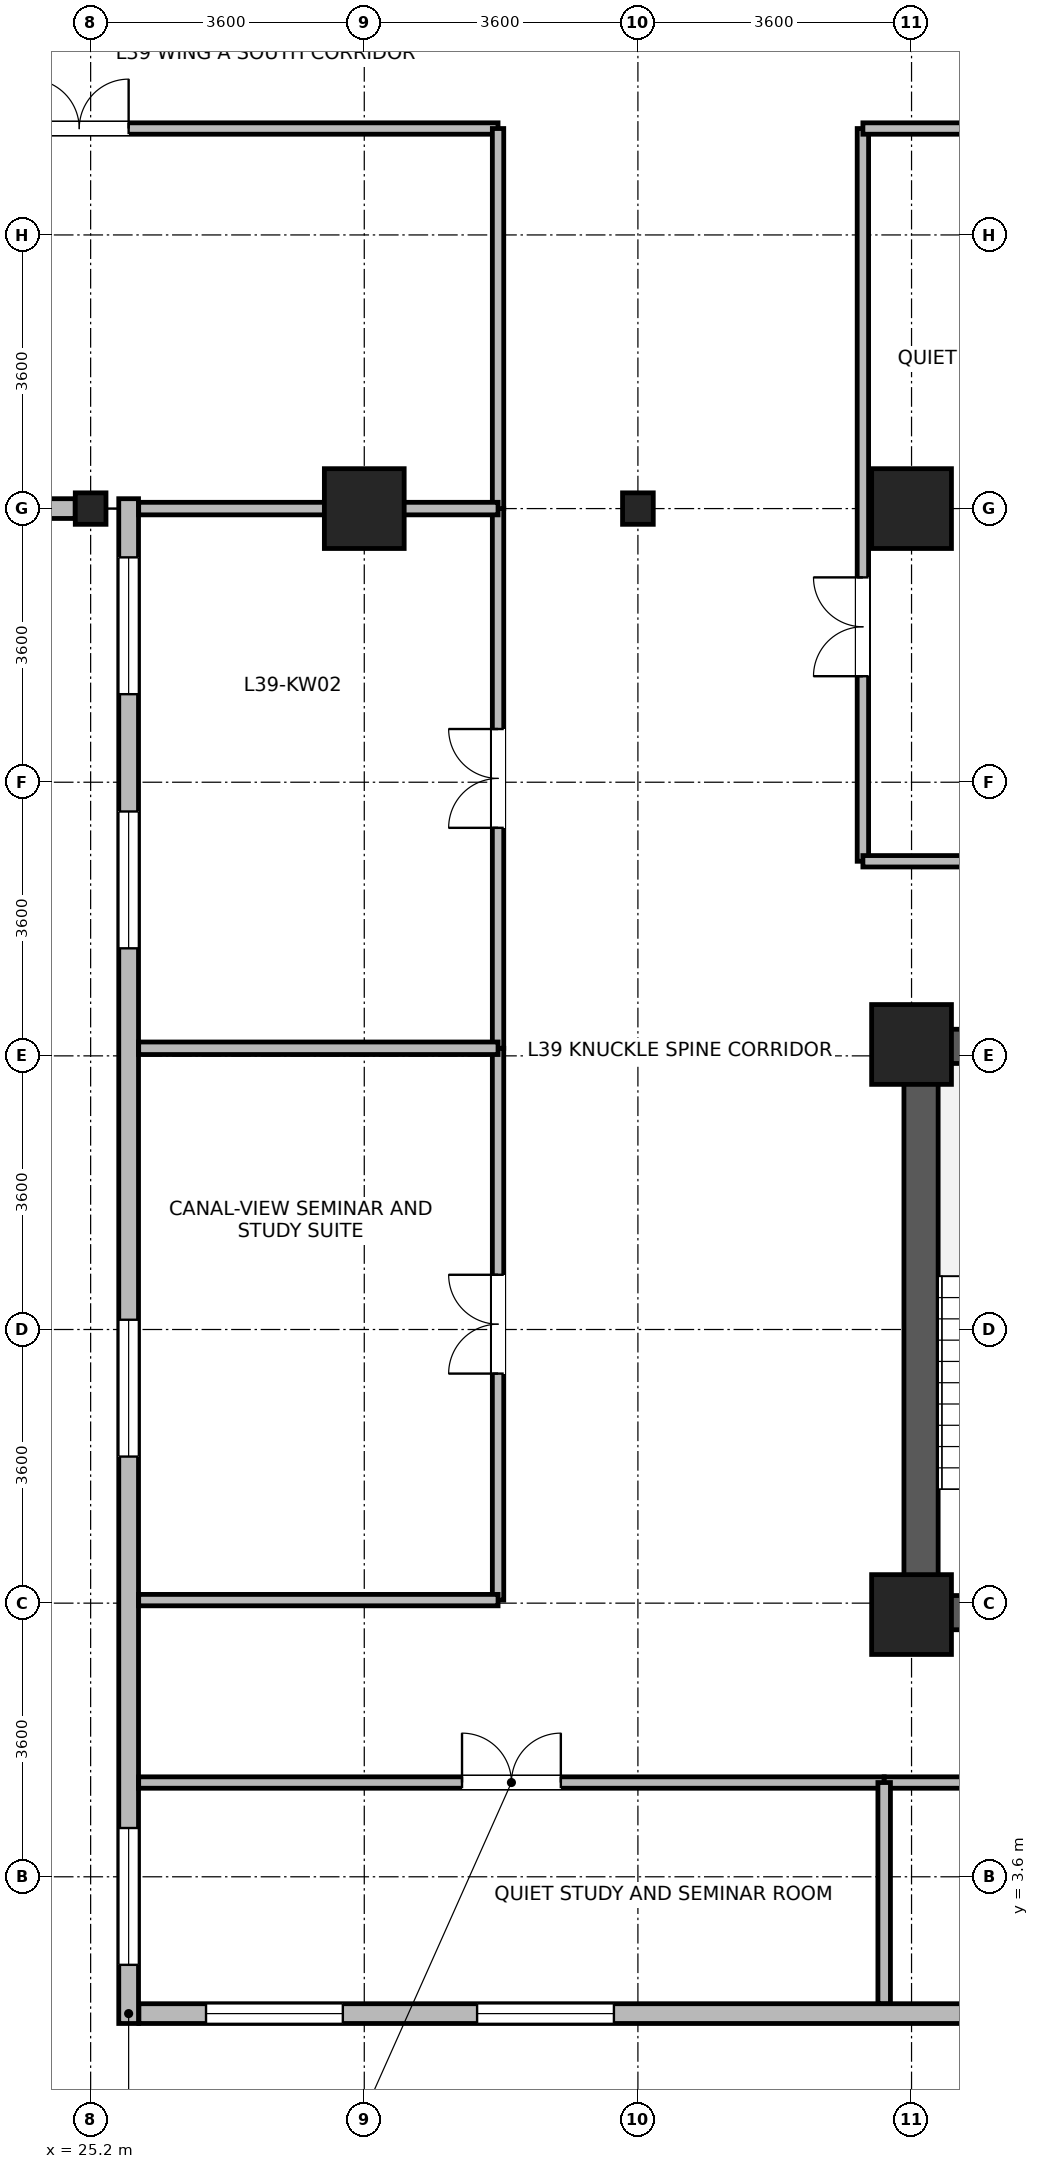
"""IFC4 building model, lengths in metres.
Left out: names, types, materials, properties, quantities, classifications, styles, units other than length and angle.
Written with IfcOpenShell. Run it as: python <this file> out.ifc"""

import sys

from ifc_helpers import new_model, si_unit, direction, frame, frame_2d, origin, origin_2d, place, context, subcontext, project, spatial, rectangle, i_section, extrude, source, transform, mapped, element, fill, save


model = new_model("IFC4")
c1 = context("Model", 3, precision=1e-05, world=origin(), true_north=direction((0.0, 1.0)))
c2 = subcontext(c1, "Body", "Model", "MODEL_VIEW")
j1 = project(units=[si_unit("LENGTHUNIT", "METRE"), si_unit("PLANEANGLEUNIT", "RADIAN")], contexts=[c1])
p1 = place(None, origin())
s1 = spatial("IfcSite", under=j1, at=p1, CompositionType="ELEMENT")
p2 = place(p1, origin())
s2 = spatial("IfcBuilding", under=s1, at=p2, CompositionType="ELEMENT")
p3 = place(p2, frame((0.0, 0.0, 155.0)))
s3 = spatial("IfcBuildingStorey", under=s2, at=p3, CompositionType="ELEMENT", Elevation=155.0)
p4 = place(p3, frame((36.125, 6.85, 0.0), z_axis=(0.0, 0.0, 1.0), x_axis=(0.0, 1.0, 0.0)))
e1 = element("IfcWall", 1, at=p4, inside=s3, PredefinedType="SHEAR", context=c2, shape_type="SweptSolid", body=[
    extrude(rectangle(XDim=7.9, YDim=0.45, at=frame_2d((3.95, 0.0))), origin(), (0.0, 0.0, 1.0), 3.46),
])
for number, where, z_axis, x_axis in (
    (2, (36.35, 7.075, 0.0), (0.0, 0.0, 1.0), (1.0, 0.0, 0.0)),
    (3, (36.35, 14.525, 0.0), (0.0, 0.0, 1.0), (1.0, 0.0, 0.0)),
):
    element("IfcWall", number, at=place(p3, frame(where, z_axis=z_axis, x_axis=x_axis)), inside=s3, PredefinedType="SHEAR", context=c2, shape_type="SweptSolid", body=[
        extrude(rectangle(XDim=3.2, YDim=0.45, at=frame_2d((1.6, 0.0))), origin(), (0.0, 0.0, 1.0), 3.46),
    ])
m1 = source(origin(), c2, "Body", "SweptSolid", [
    extrude(rectangle(XDim=1.05, YDim=1.05, at=origin_2d()), origin(), (0.0, 0.0, 1.0), 3.7),
])
for number, where, z_axis, x_axis in (
    (4, (28.8, 21.6, 0.0), (0.0, 0.0, 1.0), (1.0, 0.0, 0.0)),
    (5, (36.0, 21.6, 0.0), (0.0, 0.0, 1.0), (1.0, 0.0, 0.0)),
    (6, (36.0, 7.05, 0.0), (0.0, 0.0, 1.0), (1.0, 0.0, 0.0)),
    (7, (36.0, 14.55, 0.0), (0.0, 0.0, 1.0), (1.0, 0.0, 0.0)),
):
    element("IfcColumn", number, at=place(p3, frame(where, z_axis=z_axis, x_axis=x_axis)), inside=s3, PredefinedType="COLUMN", context=c2, shape_type="MappedRepresentation", body=[
        mapped(m1, transform((0.0, 0.0, 0.0), x_axis=(1.0, 0.0, 0.0), y_axis=(0.0, 1.0, 0.0), z_axis=(0.0, 0.0, 1.0), scale=1.0)),
    ])
m2 = source(origin(), c2, "Body", "SweptSolid", [
    extrude(i_section(OverallWidth=0.404, OverallDepth=0.414, WebThickness=0.021, FlangeThickness=0.028, FilletRadius=0.015, at=origin_2d()), origin(), (0.0, 0.0, 1.0), 3.7),
])
for number, where, z_axis, x_axis in (
    (8, (25.2, 21.6, 0.0), (0.0, 0.0, 1.0), (1.0, 0.0, 0.0)),
    (9, (32.4, 21.6, 0.0), (0.0, 0.0, 1.0), (1.0, 0.0, 0.0)),
):
    element("IfcColumn", number, at=place(p3, frame(where, z_axis=z_axis, x_axis=x_axis)), inside=s3, PredefinedType="COLUMN", context=c2, shape_type="MappedRepresentation", body=[
        mapped(m2, transform((0.0, 0.0, 0.0), x_axis=(1.0, 0.0, 0.0), y_axis=(0.0, 1.0, 0.0), z_axis=(0.0, 0.0, 1.0), scale=1.0)),
    ])
p5 = place(p3, frame((54.365, 1.8, 0.0), z_axis=(0.0, 0.0, 1.0), x_axis=(-1.0, 0.0, 0.0)))
e10 = element("IfcWall", 10, at=p5, inside=s3, PredefinedType="STANDARD", context=c2, shape_type="SweptSolid", body=[
    extrude(rectangle(XDim=28.53, YDim=0.26, at=frame_2d((14.265, 0.0))), origin(), (0.0, 0.0, 1.0), 3.44),
])
p6 = place(p5, frame((0.883, 0.0, 0.85)))
e11 = element("IfcOpeningElement", 11, at=p6, cuts=e10, PredefinedType="OPENING", context=c2, shape_type="SweptSolid", body=[
    extrude(rectangle(XDim=1.8, YDim=1.85, at=frame_2d((0.9, 0.925))), frame((0.0, 0.14, 0.0), z_axis=(0.0, -1.0, 0.0), x_axis=(1.0, 0.0, 0.0)), (0.0, 0.0, 1.0), 0.28),
])
p7 = place(p5, frame((4.449, 0.0, 0.85)))
e12 = element("IfcOpeningElement", 12, at=p7, cuts=e10, PredefinedType="OPENING", context=c2, shape_type="SweptSolid", body=[
    extrude(rectangle(XDim=1.8, YDim=1.85, at=frame_2d((0.9, 0.925))), frame((0.0, 0.14, 0.0), z_axis=(0.0, -1.0, 0.0), x_axis=(1.0, 0.0, 0.0)), (0.0, 0.0, 1.0), 0.28),
])
p8 = place(p5, frame((11.582, 0.0, 0.85)))
e13 = element("IfcOpeningElement", 13, at=p8, cuts=e10, PredefinedType="OPENING", context=c2, shape_type="SweptSolid", body=[
    extrude(rectangle(XDim=1.8, YDim=1.85, at=frame_2d((0.9, 0.925))), frame((0.0, 0.14, 0.0), z_axis=(0.0, -1.0, 0.0), x_axis=(1.0, 0.0, 0.0)), (0.0, 0.0, 1.0), 0.28),
])
p9 = place(p5, frame((15.148, 0.0, 0.85)))
e14 = element("IfcOpeningElement", 14, at=p9, cuts=e10, PredefinedType="OPENING", context=c2, shape_type="SweptSolid", body=[
    extrude(rectangle(XDim=1.8, YDim=1.85, at=frame_2d((0.9, 0.925))), frame((0.0, 0.14, 0.0), z_axis=(0.0, -1.0, 0.0), x_axis=(1.0, 0.0, 0.0)), (0.0, 0.0, 1.0), 0.28),
])
p10 = place(p5, frame((22.281, 0.0, 0.85)))
e15 = element("IfcOpeningElement", 15, at=p10, cuts=e10, PredefinedType="OPENING", context=c2, shape_type="SweptSolid", body=[
    extrude(rectangle(XDim=1.8, YDim=1.85, at=frame_2d((0.9, 0.925))), frame((0.0, 0.14, 0.0), z_axis=(0.0, -1.0, 0.0), x_axis=(1.0, 0.0, 0.0)), (0.0, 0.0, 1.0), 0.28),
])
p11 = place(p5, frame((25.847, 0.0, 0.85)))
e16 = element("IfcOpeningElement", 16, at=p11, cuts=e10, PredefinedType="OPENING", context=c2, shape_type="SweptSolid", body=[
    extrude(rectangle(XDim=1.8, YDim=1.85, at=frame_2d((0.9, 0.925))), frame((0.0, 0.14, 0.0), z_axis=(0.0, -1.0, 0.0), x_axis=(1.0, 0.0, 0.0)), (0.0, 0.0, 1.0), 0.28),
])
p12 = place(p3, frame((24.997, 21.6, 0.0), z_axis=(0.0, 0.0, 1.0), x_axis=(-1.0, 0.0, 0.0)))
e17 = element("IfcWall", 17, at=p12, inside=s3, PredefinedType="STANDARD", context=c2, shape_type="SweptSolid", body=[
    extrude(rectangle(XDim=2.871, YDim=0.26, at=frame_2d((1.436, 0.0))), origin(), (0.0, 0.0, 1.0), 2.99),
])
p13 = place(p12, frame((0.96, 0.0, 0.85)))
e18 = element("IfcOpeningElement", 18, at=p13, cuts=e17, PredefinedType="OPENING", context=c2, shape_type="SweptSolid", body=[
    extrude(rectangle(XDim=0.95, YDim=1.75, at=frame_2d((0.475, 0.875))), frame((0.0, 0.14, 0.0), z_axis=(0.0, -1.0, 0.0), x_axis=(1.0, 0.0, 0.0)), (0.0, 0.0, 1.0), 0.28),
])
p14 = place(p3, frame((25.7, 1.67, 0.0), z_axis=(0.0, 0.0, 1.0), x_axis=(0.0, 1.0, 0.0)))
e19 = element("IfcWall", 19, at=p14, inside=s3, PredefinedType="STANDARD", context=c2, shape_type="SweptSolid", body=[
    extrude(rectangle(XDim=20.06, YDim=0.26, at=frame_2d((10.03, 0.0))), origin(), (0.0, 0.0, 1.0), 3.44),
])
p15 = place(p14, frame((0.772, 0.0, 0.85)))
e20 = element("IfcOpeningElement", 20, at=p15, cuts=e19, PredefinedType="OPENING", context=c2, shape_type="SweptSolid", body=[
    extrude(rectangle(XDim=1.8, YDim=1.85, at=frame_2d((0.9, 0.925))), frame((0.0, 0.14, 0.0), z_axis=(0.0, -1.0, 0.0), x_axis=(1.0, 0.0, 0.0)), (0.0, 0.0, 1.0), 0.28),
])
p16 = place(p14, frame((7.458, 0.0, 0.85)))
e21 = element("IfcOpeningElement", 21, at=p16, cuts=e19, PredefinedType="OPENING", context=c2, shape_type="SweptSolid", body=[
    extrude(rectangle(XDim=1.8, YDim=1.85, at=frame_2d((0.9, 0.925))), frame((0.0, 0.14, 0.0), z_axis=(0.0, -1.0, 0.0), x_axis=(1.0, 0.0, 0.0)), (0.0, 0.0, 1.0), 0.28),
])
p17 = place(p14, frame((14.145, 0.0, 0.85)))
e22 = element("IfcOpeningElement", 22, at=p17, cuts=e19, PredefinedType="OPENING", context=c2, shape_type="SweptSolid", body=[
    extrude(rectangle(XDim=1.8, YDim=1.85, at=frame_2d((0.9, 0.925))), frame((0.0, 0.14, 0.0), z_axis=(0.0, -1.0, 0.0), x_axis=(1.0, 0.0, 0.0)), (0.0, 0.0, 1.0), 0.28),
])
p18 = place(p14, frame((17.488, 0.0, 0.85)))
e23 = element("IfcOpeningElement", 23, at=p18, cuts=e19, PredefinedType="OPENING", context=c2, shape_type="SweptSolid", body=[
    extrude(rectangle(XDim=1.8, YDim=1.85, at=frame_2d((0.9, 0.925))), frame((0.0, 0.14, 0.0), z_axis=(0.0, -1.0, 0.0), x_axis=(1.0, 0.0, 0.0)), (0.0, 0.0, 1.0), 0.28),
])
p19 = place(p3, frame((19.54, 26.6, 0.0), z_axis=(0.0, 0.0, 1.0), x_axis=(1.0, 0.0, 0.0)))
e24 = element("IfcWall", 24, at=p19, inside=s3, PredefinedType="PARTITIONING", context=c2, shape_type="SweptSolid", body=[
    extrude(rectangle(XDim=11.02, YDim=0.15, at=frame_2d((5.51, 0.0))), origin(), (0.0, 0.0, 1.0), 3.44),
])
p20 = place(p19, frame((4.86, 0.0, 0.0)))
e25 = element("IfcOpeningElement", 25, at=p20, cuts=e24, PredefinedType="OPENING", context=c2, shape_type="SweptSolid", body=[
    extrude(rectangle(XDim=1.3, YDim=2.12, at=frame_2d((0.65, 1.06))), frame((0.0, 0.085, 0.0), z_axis=(0.0, -1.0, 0.0), x_axis=(1.0, 0.0, 0.0)), (0.0, 0.0, 1.0), 0.17),
])
p21 = place(p3, frame((25.832, 4.84, 0.0), z_axis=(0.0, 0.0, 1.0), x_axis=(1.0, 0.0, 0.0)))
e26 = element("IfcWall", 26, at=p21, inside=s3, PredefinedType="PARTITIONING", context=c2, shape_type="SweptSolid", body=[
    extrude(rectangle(XDim=9.808, YDim=0.15, at=frame_2d((4.904, 0.0))), origin(), (0.0, 0.0, 1.0), 3.44),
])
p22 = place(p21, frame((4.254, 0.0, 0.0)))
e27 = element("IfcOpeningElement", 27, at=p22, cuts=e26, PredefinedType="OPENING", context=c2, shape_type="SweptSolid", body=[
    extrude(rectangle(XDim=1.3, YDim=2.12, at=frame_2d((0.65, 1.06))), frame((0.0, 0.085, 0.0), z_axis=(0.0, -1.0, 0.0), x_axis=(1.0, 0.0, 0.0)), (0.0, 0.0, 1.0), 0.17),
])
p23 = place(p3, frame((35.36, 16.96, 0.0), z_axis=(0.0, 0.0, 1.0), x_axis=(0.0, 1.0, 0.0)))
e28 = element("IfcWall", 28, at=p23, inside=s3, PredefinedType="PARTITIONING", context=c2, shape_type="SweptSolid", body=[
    extrude(rectangle(XDim=9.64, YDim=0.15, at=frame_2d((4.82, 0.0))), origin(), (0.0, 0.0, 1.0), 3.44),
])
p24 = place(p23, frame((2.435, 0.0, 0.0)))
e29 = element("IfcOpeningElement", 29, at=p24, cuts=e28, PredefinedType="OPENING", context=c2, shape_type="SweptSolid", body=[
    extrude(rectangle(XDim=1.3, YDim=2.12, at=frame_2d((0.65, 1.06))), frame((0.0, 0.085, 0.0), z_axis=(0.0, -1.0, 0.0), x_axis=(1.0, 0.0, 0.0)), (0.0, 0.0, 1.0), 0.17),
])
p25 = place(p3, frame((35.64, 4.84, 0.0), z_axis=(0.0, 0.0, 1.0), x_axis=(1.0, 0.0, 0.0)))
e30 = element("IfcWall", 30, at=p25, inside=s3, PredefinedType="PARTITIONING", context=c2, shape_type="SweptSolid", body=[
    extrude(rectangle(XDim=9.18, YDim=0.15, at=frame_2d((4.59, 0.0))), origin(), (0.0, 0.0, 1.0), 3.44),
])
p26 = place(p25, frame((4.115, 0.0, 0.0)))
e31 = element("IfcOpeningElement", 31, at=p26, cuts=e30, PredefinedType="OPENING", context=c2, shape_type="SweptSolid", body=[
    extrude(rectangle(XDim=0.95, YDim=2.1, at=frame_2d((0.475, 1.05))), frame((0.0, 0.085, 0.0), z_axis=(0.0, -1.0, 0.0), x_axis=(1.0, 0.0, 0.0)), (0.0, 0.0, 1.0), 0.17),
])
p27 = place(p3, frame((30.56, 7.24, 0.0), z_axis=(0.0, 0.0, 1.0), x_axis=(0.0, 1.0, 0.0)))
e32 = element("IfcWall", 32, at=p27, inside=s3, PredefinedType="PARTITIONING", context=c2, shape_type="SweptSolid", body=[
    extrude(rectangle(XDim=7.26, YDim=0.15, at=frame_2d((3.63, 0.0))), origin(), (0.0, 0.0, 1.0), 3.44),
])
p28 = place(p27, frame((2.98, 0.0, 0.0)))
e33 = element("IfcOpeningElement", 33, at=p28, cuts=e32, PredefinedType="OPENING", context=c2, shape_type="SweptSolid", body=[
    extrude(rectangle(XDim=1.3, YDim=2.12, at=frame_2d((0.65, 1.06))), frame((0.0, 0.085, 0.0), z_axis=(0.0, -1.0, 0.0), x_axis=(1.0, 0.0, 0.0)), (0.0, 0.0, 1.0), 0.17),
])
p29 = place(p3, frame((30.56, 14.5, 0.0), z_axis=(0.0, 0.0, 1.0), x_axis=(0.0, 1.0, 0.0)))
e34 = element("IfcWall", 34, at=p29, inside=s3, PredefinedType="PARTITIONING", context=c2, shape_type="SweptSolid", body=[
    extrude(rectangle(XDim=7.1, YDim=0.15, at=frame_2d((3.55, 0.0))), origin(), (0.0, 0.0, 1.0), 3.44),
])
p30 = place(p29, frame((2.9, 0.0, 0.0)))
e35 = element("IfcOpeningElement", 35, at=p30, cuts=e34, PredefinedType="OPENING", context=c2, shape_type="SweptSolid", body=[
    extrude(rectangle(XDim=1.3, YDim=2.12, at=frame_2d((0.65, 1.06))), frame((0.0, 0.085, 0.0), z_axis=(0.0, -1.0, 0.0), x_axis=(1.0, 0.0, 0.0)), (0.0, 0.0, 1.0), 0.17),
])
for number, where, z_axis, x_axis in (
    (36, (35.36, 16.96, 0.0), (0.0, 0.0, 1.0), (1.0, 0.0, 0.0)),
    (37, (35.36, 26.6, 0.0), (0.0, 0.0, 1.0), (1.0, 0.0, 0.0)),
):
    element("IfcWall", number, at=place(p3, frame(where, z_axis=z_axis, x_axis=x_axis)), inside=s3, PredefinedType="PARTITIONING", context=c2, shape_type="SweptSolid", body=[
        extrude(rectangle(XDim=5.38, YDim=0.15, at=frame_2d((2.69, 0.0))), origin(), (0.0, 0.0, 1.0), 3.44),
    ])
p31 = place(p3, frame((30.56, 21.6, 0.0), z_axis=(0.0, 0.0, 1.0), x_axis=(0.0, 1.0, 0.0)))
e38 = element("IfcWall", 38, at=p31, inside=s3, PredefinedType="PARTITIONING", context=c2, shape_type="SweptSolid", body=[
    extrude(rectangle(XDim=5.0, YDim=0.15, at=frame_2d((2.5, 0.0))), origin(), (0.0, 0.0, 1.0), 3.44),
])
p32 = place(p3, frame((25.832, 7.24, 0.0), z_axis=(0.0, 0.0, 1.0), x_axis=(1.0, 0.0, 0.0)))
e39 = element("IfcWall", 39, at=p32, inside=s3, PredefinedType="PARTITIONING", context=c2, shape_type="SweptSolid", body=[
    extrude(rectangle(XDim=4.728, YDim=0.15, at=frame_2d((2.364, 0.0))), origin(), (0.0, 0.0, 1.0), 3.44),
])
p33 = place(p3, frame((25.832, 14.5, 0.0), z_axis=(0.0, 0.0, 1.0), x_axis=(1.0, 0.0, 0.0)))
e40 = element("IfcWall", 40, at=p33, inside=s3, PredefinedType="PARTITIONING", context=c2, shape_type="SweptSolid", body=[
    extrude(rectangle(XDim=4.728, YDim=0.165, at=frame_2d((2.364, 0.0))), origin(), (0.0, 0.0, 1.0), 3.44),
])
p34 = place(p3, frame((25.832, 21.6, 0.0), z_axis=(0.0, 0.0, 1.0), x_axis=(1.0, 0.0, 0.0)))
e41 = element("IfcWall", 41, at=p34, inside=s3, PredefinedType="PARTITIONING", context=c2, shape_type="SweptSolid", body=[
    extrude(rectangle(XDim=4.728, YDim=0.165, at=frame_2d((2.364, 0.0))), origin(), (0.0, 0.0, 1.0), 2.99),
])
p35 = place(p3, frame((35.64, 1.932, 0.0), z_axis=(0.0, 0.0, 1.0), x_axis=(0.0, 1.0, 0.0)))
e42 = element("IfcWall", 42, at=p35, inside=s3, PredefinedType="PARTITIONING", context=c2, shape_type="SweptSolid", body=[
    extrude(rectangle(XDim=2.908, YDim=0.165, at=frame_2d((1.454, 0.0))), origin(), (0.0, 0.0, 1.0), 3.44),
])
p36 = place(p10, origin())
e43 = element("IfcWindow", 43, at=p36, inside=s3, PartitioningType="SINGLE_PANEL", PredefinedType="WINDOW", context=c2, shape_type="SweptSolid", body=[
    extrude(rectangle(XDim=1.8, YDim=1.85, at=frame_2d((0.9, 0.925))), frame((0.0, 0.03, 0.0), z_axis=(0.0, -1.0, 0.0), x_axis=(1.0, 0.0, 0.0)), (0.0, 0.0, 1.0), 0.06),
])
fill(e15, e43)
p37 = place(p11, origin())
e44 = element("IfcWindow", 44, at=p37, inside=s3, PartitioningType="SINGLE_PANEL", PredefinedType="WINDOW", context=c2, shape_type="SweptSolid", body=[
    extrude(rectangle(XDim=1.8, YDim=1.85, at=frame_2d((0.9, 0.925))), frame((0.0, 0.03, 0.0), z_axis=(0.0, -1.0, 0.0), x_axis=(1.0, 0.0, 0.0)), (0.0, 0.0, 1.0), 0.06),
])
fill(e16, e44)
p38 = place(p15, origin())
e45 = element("IfcWindow", 45, at=p38, inside=s3, PartitioningType="SINGLE_PANEL", PredefinedType="WINDOW", context=c2, shape_type="SweptSolid", body=[
    extrude(rectangle(XDim=1.8, YDim=1.85, at=frame_2d((0.9, 0.925))), frame((0.0, 0.03, 0.0), z_axis=(0.0, -1.0, 0.0), x_axis=(1.0, 0.0, 0.0)), (0.0, 0.0, 1.0), 0.06),
])
fill(e20, e45)
p39 = place(p16, origin())
e46 = element("IfcWindow", 46, at=p39, inside=s3, PartitioningType="SINGLE_PANEL", PredefinedType="WINDOW", context=c2, shape_type="SweptSolid", body=[
    extrude(rectangle(XDim=1.8, YDim=1.85, at=frame_2d((0.9, 0.925))), frame((0.0, 0.03, 0.0), z_axis=(0.0, -1.0, 0.0), x_axis=(1.0, 0.0, 0.0)), (0.0, 0.0, 1.0), 0.06),
])
fill(e21, e46)
p40 = place(p17, origin())
e47 = element("IfcWindow", 47, at=p40, inside=s3, PartitioningType="SINGLE_PANEL", PredefinedType="WINDOW", context=c2, shape_type="SweptSolid", body=[
    extrude(rectangle(XDim=1.8, YDim=1.85, at=frame_2d((0.9, 0.925))), frame((0.0, 0.03, 0.0), z_axis=(0.0, -1.0, 0.0), x_axis=(1.0, 0.0, 0.0)), (0.0, 0.0, 1.0), 0.06),
])
fill(e22, e47)
p41 = place(p18, origin())
e48 = element("IfcWindow", 48, at=p41, inside=s3, PartitioningType="SINGLE_PANEL", PredefinedType="WINDOW", context=c2, shape_type="SweptSolid", body=[
    extrude(rectangle(XDim=1.8, YDim=1.85, at=frame_2d((0.9, 0.925))), frame((0.0, 0.03, 0.0), z_axis=(0.0, -1.0, 0.0), x_axis=(1.0, 0.0, 0.0)), (0.0, 0.0, 1.0), 0.06),
])
fill(e23, e48)
p42 = place(p20, origin())
e49 = element("IfcDoor", 49, at=p42, inside=s3, OperationType="DOUBLE_DOOR_SINGLE_SWING", PredefinedType="DOOR", context=c2, shape_type="SweptSolid", body=[
    extrude(rectangle(XDim=1.3, YDim=2.12, at=frame_2d((0.65, 1.06))), frame((0.0, 0.025, 0.0), z_axis=(0.0, -1.0, 0.0), x_axis=(1.0, 0.0, 0.0)), (0.0, 0.0, 1.0), 0.05),
])
fill(e25, e49)
p43 = place(p22, origin())
e50 = element("IfcDoor", 50, at=p43, inside=s3, OperationType="DOUBLE_DOOR_SINGLE_SWING", PredefinedType="DOOR", context=c2, shape_type="SweptSolid", body=[
    extrude(rectangle(XDim=1.3, YDim=2.12, at=frame_2d((0.65, 1.06))), frame((0.0, 0.025, 0.0), z_axis=(0.0, -1.0, 0.0), x_axis=(1.0, 0.0, 0.0)), (0.0, 0.0, 1.0), 0.05),
])
fill(e27, e50)
p44 = place(p24, origin())
e51 = element("IfcDoor", 51, at=p44, inside=s3, OperationType="DOUBLE_DOOR_SINGLE_SWING", PredefinedType="DOOR", context=c2, shape_type="SweptSolid", body=[
    extrude(rectangle(XDim=1.3, YDim=2.12, at=frame_2d((0.65, 1.06))), frame((0.0, 0.025, 0.0), z_axis=(0.0, -1.0, 0.0), x_axis=(1.0, 0.0, 0.0)), (0.0, 0.0, 1.0), 0.05),
])
fill(e29, e51)
p45 = place(p28, origin())
e52 = element("IfcDoor", 52, at=p45, inside=s3, OperationType="DOUBLE_DOOR_SINGLE_SWING", PredefinedType="DOOR", context=c2, shape_type="SweptSolid", body=[
    extrude(rectangle(XDim=1.3, YDim=2.12, at=frame_2d((0.65, 1.06))), frame((0.0, 0.025, 0.0), z_axis=(0.0, -1.0, 0.0), x_axis=(1.0, 0.0, 0.0)), (0.0, 0.0, 1.0), 0.05),
])
fill(e33, e52)
p46 = place(p30, origin())
e53 = element("IfcDoor", 53, at=p46, inside=s3, OperationType="DOUBLE_DOOR_SINGLE_SWING", PredefinedType="DOOR", context=c2, shape_type="SweptSolid", body=[
    extrude(rectangle(XDim=1.3, YDim=2.12, at=frame_2d((0.65, 1.06))), frame((0.0, 0.025, 0.0), z_axis=(0.0, -1.0, 0.0), x_axis=(1.0, 0.0, 0.0)), (0.0, 0.0, 1.0), 0.05),
])
fill(e35, e53)
save(model, sys.argv[1])
